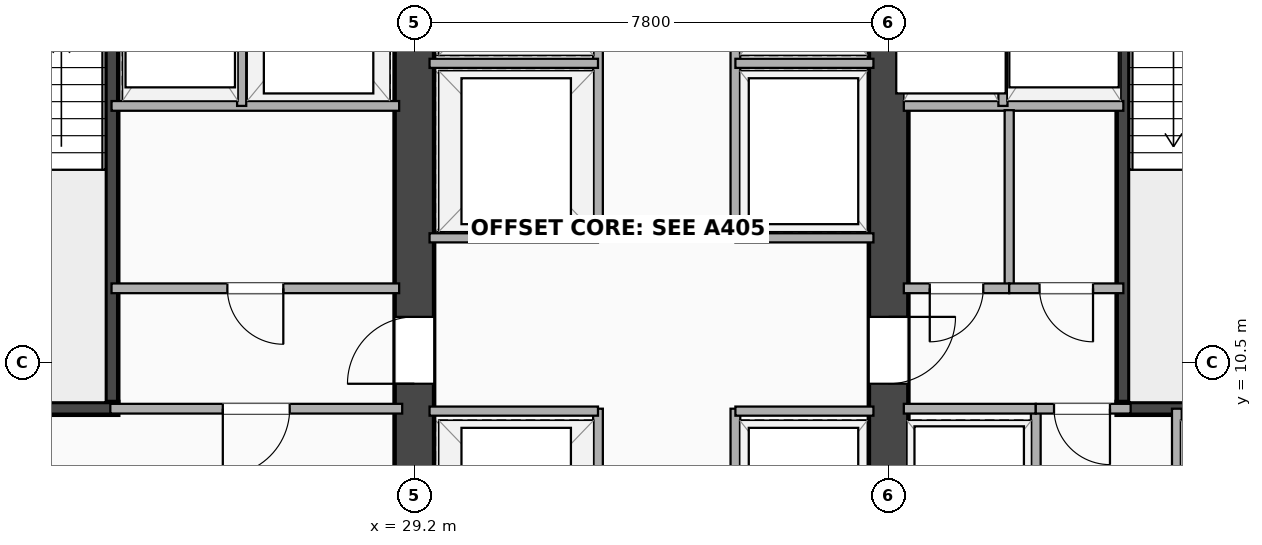
"""IFC4 building model, lengths in metres.
Left out: names, types, materials, properties, quantities, classifications, styles, units other than length and angle.
Written with IfcOpenShell. Run it as: python <this file> out.ifc"""

import sys

from ifc_helpers import new_model, si_unit, direction, frame, frame_2d, origin, place, context, subcontext, project, spatial, rectangle, extrude, element, fill, save


model = new_model("IFC4")
c1 = context("Model", 3, precision=1e-05, world=origin(), true_north=direction((0.0, 1.0)))
c2 = subcontext(c1, "Body", "Model", "MODEL_VIEW")
j1 = project(units=[si_unit("LENGTHUNIT", "METRE"), si_unit("PLANEANGLEUNIT", "RADIAN")], contexts=[c1])
p1 = place(None, origin())
s1 = spatial("IfcSite", under=j1, at=p1, CompositionType="ELEMENT")
p2 = place(p1, origin())
s2 = spatial("IfcBuilding", under=s1, at=p2, CompositionType="ELEMENT")
p3 = place(p2, frame((0.0, 0.0, 68.4)))
s3 = spatial("IfcBuildingStorey", under=s2, at=p3, CompositionType="ELEMENT", Elevation=68.4)
p4 = place(p3, frame((29.2, 3.5, 0.0), z_axis=(0.0, 0.0, 1.0), x_axis=(0.0, 1.0, 0.0)))
e1 = element("IfcWall", 1, at=p4, inside=s3, PredefinedType="SHEAR", context=c2, shape_type="SweptSolid", body=[
    extrude(rectangle(XDim=16.9, YDim=0.65, at=frame_2d((8.45, 0.0))), origin(), (0.0, 0.0, 1.0), 3.22),
])
p5 = place(p4, frame((7.75, 0.0, 0.0), z_axis=(0.0, 0.0, 1.0), x_axis=(-1.0, 0.0, 0.0)))
e2 = element("IfcOpeningElement", 2, at=p5, cuts=e1, PredefinedType="OPENING", context=c2, shape_type="SweptSolid", body=[
    extrude(rectangle(XDim=1.1, YDim=2.15, at=frame_2d((0.55, 1.075))), frame((0.0, 0.335, 0.0), z_axis=(0.0, -1.0, 0.0), x_axis=(1.0, 0.0, 0.0)), (0.0, 0.0, 1.0), 0.67),
])
p6 = place(p3, frame((37.0, 3.5, 0.0), z_axis=(0.0, 0.0, 1.0), x_axis=(0.0, 1.0, 0.0)))
e3 = element("IfcWall", 3, at=p6, inside=s3, PredefinedType="SHEAR", context=c2, shape_type="SweptSolid", body=[
    extrude(rectangle(XDim=16.9, YDim=0.65, at=frame_2d((8.45, 0.0))), origin(), (0.0, 0.0, 1.0), 3.22),
])
p7 = place(p6, frame((6.65, 0.0, 0.0)))
e4 = element("IfcOpeningElement", 4, at=p7, cuts=e3, PredefinedType="OPENING", context=c2, shape_type="SweptSolid", body=[
    extrude(rectangle(XDim=1.1, YDim=2.15, at=frame_2d((0.55, 1.075))), frame((0.0, 0.335, 0.0), z_axis=(0.0, -1.0, 0.0), x_axis=(1.0, 0.0, 0.0)), (0.0, 0.0, 1.0), 0.67),
])
p8 = place(p3, frame((24.225, 9.745, 0.0), z_axis=(0.0, 0.0, 1.0), x_axis=(0.0, 1.0, 0.0)))
e5 = element("IfcWall", 5, at=p8, inside=s3, PredefinedType="SHEAR", context=c2, shape_type="SweptSolid", body=[
    extrude(rectangle(XDim=8.01, YDim=0.21, at=frame_2d((4.005, 0.0))), origin(), (0.0, 0.0, 1.0), 3.22),
])
p9 = place(p3, frame((20.67, 9.745, 0.0), z_axis=(0.0, 0.0, 1.0), x_axis=(1.0, 0.0, 0.0)))
e6 = element("IfcWall", 6, at=p9, inside=s3, PredefinedType="SHEAR", context=c2, shape_type="SweptSolid", body=[
    extrude(rectangle(XDim=3.66, YDim=0.21, at=frame_2d((1.83, 0.0))), origin(), (0.0, 0.0, 1.0), 3.22),
])
p10 = place(p3, frame((40.855, 9.745, 0.0), z_axis=(0.0, 0.0, 1.0), x_axis=(0.0, 1.0, 0.0)))
e7 = element("IfcWall", 7, at=p10, inside=s3, PredefinedType="SHEAR", context=c2, shape_type="SweptSolid", body=[
    extrude(rectangle(XDim=8.01, YDim=0.21, at=frame_2d((4.005, 0.0))), origin(), (0.0, 0.0, 1.0), 3.22),
])
p11 = place(p3, frame((40.75, 9.745, 0.0), z_axis=(0.0, 0.0, 1.0), x_axis=(1.0, 0.0, 0.0)))
e8 = element("IfcWall", 8, at=p11, inside=s3, PredefinedType="SHEAR", context=c2, shape_type="SweptSolid", body=[
    extrude(rectangle(XDim=3.66, YDim=0.21, at=frame_2d((1.83, 0.0))), origin(), (0.0, 0.0, 1.0), 3.22),
])
p12 = place(p3, frame((24.22, 14.72, 0.0), z_axis=(0.0, 0.0, 1.0), x_axis=(1.0, 0.0, 0.0)))
e9 = element("IfcWall", 9, at=p12, inside=s3, PredefinedType="PARTITIONING", context=c2, shape_type="SweptSolid", body=[
    extrude(rectangle(XDim=4.73, YDim=0.16, at=frame_2d((2.365, 0.0))), origin(), (0.0, 0.0, 1.0), 3.22),
])
p13 = place(p3, frame((26.36, 14.72, 0.0), z_axis=(0.0, 0.0, 1.0), x_axis=(0.0, 1.0, 0.0)))
e10 = element("IfcWall", 10, at=p13, inside=s3, PredefinedType="PARTITIONING", context=c2, shape_type="SweptSolid", body=[
    extrude(rectangle(XDim=3.04, YDim=0.15, at=frame_2d((1.52, 0.0))), origin(), (0.0, 0.0, 1.0), 3.22),
])
p14 = place(p3, frame((37.25, 14.72, 0.0), z_axis=(0.0, 0.0, 1.0), x_axis=(1.0, 0.0, 0.0)))
e11 = element("IfcWall", 11, at=p14, inside=s3, PredefinedType="PARTITIONING", context=c2, shape_type="SweptSolid", body=[
    extrude(rectangle(XDim=3.61, YDim=0.16, at=frame_2d((1.805, 0.0))), origin(), (0.0, 0.0, 1.0), 3.22),
])
p15 = place(p3, frame((38.88, 14.72, 0.0), z_axis=(0.0, 0.0, 1.0), x_axis=(0.0, 1.0, 0.0)))
e12 = element("IfcWall", 12, at=p15, inside=s3, PredefinedType="PARTITIONING", context=c2, shape_type="SweptSolid", body=[
    extrude(rectangle(XDim=3.04, YDim=0.15, at=frame_2d((1.52, 0.0))), origin(), (0.0, 0.0, 1.0), 3.22),
])
p16 = place(p3, frame((24.22, 11.72, 0.0), z_axis=(0.0, 0.0, 1.0), x_axis=(1.0, 0.0, 0.0)))
e13 = element("IfcWall", 13, at=p16, inside=s3, PredefinedType="PARTITIONING", context=c2, shape_type="SweptSolid", body=[
    extrude(rectangle(XDim=4.73, YDim=0.16, at=frame_2d((2.365, 0.0))), origin(), (0.0, 0.0, 1.0), 3.22),
])
p17 = place(p16, frame((1.905, 0.0, 0.0)))
e14 = element("IfcOpeningElement", 14, at=p17, cuts=e13, PredefinedType="OPENING", context=c2, shape_type="SweptSolid", body=[
    extrude(rectangle(XDim=0.92, YDim=2.08, at=frame_2d((0.46, 1.04))), frame((0.0, 0.09, 0.0), z_axis=(0.0, -1.0, 0.0), x_axis=(1.0, 0.0, 0.0)), (0.0, 0.0, 1.0), 0.18),
])
p18 = place(p3, frame((38.983, 11.72, 0.0), z_axis=(0.0, 0.0, 1.0), x_axis=(0.0, 1.0, 0.0)))
e15 = element("IfcWall", 15, at=p18, inside=s3, PredefinedType="PARTITIONING", context=c2, shape_type="SweptSolid", body=[
    extrude(rectangle(XDim=2.93, YDim=0.15, at=frame_2d((1.465, 0.0))), origin(), (0.0, 0.0, 1.0), 3.22),
])
p19 = place(p3, frame((37.25, 11.72, 0.0), z_axis=(0.0, 0.0, 1.0), x_axis=(1.0, 0.0, 0.0)))
e16 = element("IfcWall", 16, at=p19, inside=s3, PredefinedType="PARTITIONING", context=c2, shape_type="SweptSolid", body=[
    extrude(rectangle(XDim=1.733, YDim=0.16, at=frame_2d((0.866, 0.0))), origin(), (0.0, 0.0, 1.0), 3.22),
])
p20 = place(p19, frame((0.427, 0.0, 0.0)))
e17 = element("IfcOpeningElement", 17, at=p20, cuts=e16, PredefinedType="OPENING", context=c2, shape_type="SweptSolid", body=[
    extrude(rectangle(XDim=0.88, YDim=2.08, at=frame_2d((0.44, 1.04))), frame((0.0, 0.09, 0.0), z_axis=(0.0, -1.0, 0.0), x_axis=(1.0, 0.0, 0.0)), (0.0, 0.0, 1.0), 0.18),
])
p21 = place(p3, frame((38.983, 11.72, 0.0), z_axis=(0.0, 0.0, 1.0), x_axis=(1.0, 0.0, 0.0)))
e18 = element("IfcWall", 18, at=p21, inside=s3, PredefinedType="PARTITIONING", context=c2, shape_type="SweptSolid", body=[
    extrude(rectangle(XDim=1.877, YDim=0.16, at=frame_2d((0.938, 0.0))), origin(), (0.0, 0.0, 1.0), 3.22),
])
p22 = place(p21, frame((0.499, 0.0, 0.0)))
e19 = element("IfcOpeningElement", 19, at=p22, cuts=e18, PredefinedType="OPENING", context=c2, shape_type="SweptSolid", body=[
    extrude(rectangle(XDim=0.88, YDim=2.08, at=frame_2d((0.44, 1.04))), frame((0.0, 0.09, 0.0), z_axis=(0.0, -1.0, 0.0), x_axis=(1.0, 0.0, 0.0)), (0.0, 0.0, 1.0), 0.18),
])
p23 = place(p3, frame((24.2, 9.74, 0.0), z_axis=(0.0, 0.0, 1.0), x_axis=(1.0, 0.0, 0.0)))
e20 = element("IfcWall", 20, at=p23, inside=s3, PredefinedType="PARTITIONING", context=c2, shape_type="SweptSolid", body=[
    extrude(rectangle(XDim=4.8, YDim=0.16, at=frame_2d((2.4, 0.0))), origin(), (0.0, 0.0, 1.0), 3.22),
])
p24 = place(p23, frame((1.85, 0.0, 0.0)))
e21 = element("IfcOpeningElement", 21, at=p24, cuts=e20, PredefinedType="OPENING", context=c2, shape_type="SweptSolid", body=[
    extrude(rectangle(XDim=1.1, YDim=2.15, at=frame_2d((0.55, 1.075))), frame((0.0, 0.09, 0.0), z_axis=(0.0, -1.0, 0.0), x_axis=(1.0, 0.0, 0.0)), (0.0, 0.0, 1.0), 0.18),
])
for number, where, z_axis, x_axis in (
    (22, (39.42, 3.9, 0.0), (0.0, 0.0, 1.0), (0.0, 1.0, 0.0)),
    (23, (41.74, 3.9, 0.0), (0.0, 0.0, 1.0), (0.0, 1.0, 0.0)),
):
    element("IfcWall", number, at=place(p3, frame(where, z_axis=z_axis, x_axis=x_axis)), inside=s3, PredefinedType="PARTITIONING", context=c2, shape_type="SweptSolid", body=[
        extrude(rectangle(XDim=5.84, YDim=0.16, at=frame_2d((2.92, 0.0))), origin(), (0.0, 0.0, 1.0), 3.22),
    ])
p25 = place(p3, frame((37.25, 9.74, 0.0), z_axis=(0.0, 0.0, 1.0), x_axis=(1.0, 0.0, 0.0)))
e24 = element("IfcWall", 24, at=p25, inside=s3, PredefinedType="PARTITIONING", context=c2, shape_type="SweptSolid", body=[
    extrude(rectangle(XDim=2.17, YDim=0.16, at=frame_2d((1.085, 0.0))), origin(), (0.0, 0.0, 1.0), 3.22),
])
p26 = place(p3, frame((39.42, 9.74, 0.0), z_axis=(0.0, 0.0, 1.0), x_axis=(1.0, 0.0, 0.0)))
e25 = element("IfcWall", 25, at=p26, inside=s3, PredefinedType="PARTITIONING", context=c2, shape_type="SweptSolid", body=[
    extrude(rectangle(XDim=1.56, YDim=0.16, at=frame_2d((0.78, 0.0))), origin(), (0.0, 0.0, 1.0), 3.22),
])
p27 = place(p26, frame((0.3, 0.0, 0.0)))
e26 = element("IfcOpeningElement", 26, at=p27, cuts=e25, PredefinedType="OPENING", context=c2, shape_type="SweptSolid", body=[
    extrude(rectangle(XDim=0.92, YDim=2.08, at=frame_2d((0.46, 1.04))), frame((0.0, 0.09, 0.0), z_axis=(0.0, -1.0, 0.0), x_axis=(1.0, 0.0, 0.0)), (0.0, 0.0, 1.0), 0.18),
])
p28 = place(p3, frame((32.22, 3.9, 0.0), z_axis=(0.0, 0.0, 1.0), x_axis=(0.0, 1.0, 0.0)))
e27 = element("IfcWall", 27, at=p28, inside=s3, PredefinedType="PARTITIONING", context=c2, shape_type="SweptSolid", body=[
    extrude(rectangle(XDim=5.84, YDim=0.16, at=frame_2d((2.92, 0.0))), origin(), (0.0, 0.0, 1.0), 3.22),
])
p29 = place(p28, frame((1.78, 0.0, 0.0), z_axis=(0.0, 0.0, 1.0), x_axis=(-1.0, 0.0, 0.0)))
e28 = element("IfcOpeningElement", 28, at=p29, cuts=e27, PredefinedType="OPENING", context=c2, shape_type="SweptSolid", body=[
    extrude(rectangle(XDim=1.08, YDim=2.16, at=frame_2d((0.54, 1.08))), frame((0.0, 0.09, 0.0), z_axis=(0.0, -1.0, 0.0), x_axis=(1.0, 0.0, 0.0)), (0.0, 0.0, 1.0), 0.18),
])
p30 = place(p28, frame((4.68, 0.0, 0.0), z_axis=(0.0, 0.0, 1.0), x_axis=(-1.0, 0.0, 0.0)))
e29 = element("IfcOpeningElement", 29, at=p30, cuts=e27, PredefinedType="OPENING", context=c2, shape_type="SweptSolid", body=[
    extrude(rectangle(XDim=1.08, YDim=2.16, at=frame_2d((0.54, 1.08))), frame((0.0, 0.09, 0.0), z_axis=(0.0, -1.0, 0.0), x_axis=(1.0, 0.0, 0.0)), (0.0, 0.0, 1.0), 0.18),
])
p31 = place(p3, frame((34.48, 3.9, 0.0), z_axis=(0.0, 0.0, 1.0), x_axis=(0.0, 1.0, 0.0)))
e30 = element("IfcWall", 30, at=p31, inside=s3, PredefinedType="PARTITIONING", context=c2, shape_type="SweptSolid", body=[
    extrude(rectangle(XDim=5.84, YDim=0.16, at=frame_2d((2.92, 0.0))), origin(), (0.0, 0.0, 1.0), 3.22),
])
p32 = place(p31, frame((0.7, 0.0, 0.0)))
e31 = element("IfcOpeningElement", 31, at=p32, cuts=e30, PredefinedType="OPENING", context=c2, shape_type="SweptSolid", body=[
    extrude(rectangle(XDim=1.08, YDim=2.16, at=frame_2d((0.54, 1.08))), frame((0.0, 0.09, 0.0), z_axis=(0.0, -1.0, 0.0), x_axis=(1.0, 0.0, 0.0)), (0.0, 0.0, 1.0), 0.18),
])
p33 = place(p31, frame((3.6, 0.0, 0.0)))
e32 = element("IfcOpeningElement", 32, at=p33, cuts=e30, PredefinedType="OPENING", context=c2, shape_type="SweptSolid", body=[
    extrude(rectangle(XDim=1.08, YDim=2.16, at=frame_2d((0.54, 1.08))), frame((0.0, 0.09, 0.0), z_axis=(0.0, -1.0, 0.0), x_axis=(1.0, 0.0, 0.0)), (0.0, 0.0, 1.0), 0.18),
])
p34 = place(p3, frame((29.45, 9.7, 0.0), z_axis=(0.0, 0.0, 1.0), x_axis=(1.0, 0.0, 0.0)))
e33 = element("IfcWall", 33, at=p34, inside=s3, PredefinedType="PARTITIONING", context=c2, shape_type="SweptSolid", body=[
    extrude(rectangle(XDim=2.77, YDim=0.15, at=frame_2d((1.385, 0.0))), origin(), (0.0, 0.0, 1.0), 3.22),
])
p35 = place(p3, frame((34.48, 9.7, 0.0), z_axis=(0.0, 0.0, 1.0), x_axis=(1.0, 0.0, 0.0)))
e34 = element("IfcWall", 34, at=p35, inside=s3, PredefinedType="PARTITIONING", context=c2, shape_type="SweptSolid", body=[
    extrude(rectangle(XDim=2.27, YDim=0.15, at=frame_2d((1.135, 0.0))), origin(), (0.0, 0.0, 1.0), 3.22),
])
p36 = place(p3, frame((32.22, 12.5, 0.0), z_axis=(0.0, 0.0, 1.0), x_axis=(0.0, 1.0, 0.0)))
e35 = element("IfcWall", 35, at=p36, inside=s3, PredefinedType="PARTITIONING", context=c2, shape_type="SweptSolid", body=[
    extrude(rectangle(XDim=7.92, YDim=0.16, at=frame_2d((3.96, 0.0))), origin(), (0.0, 0.0, 1.0), 2.51),
])
p37 = place(p36, frame((6.1, 0.0, 0.0)))
e36 = element("IfcOpeningElement", 36, at=p37, cuts=e35, PredefinedType="OPENING", context=c2, shape_type="SweptSolid", body=[
    extrude(rectangle(XDim=0.88, YDim=2.08, at=frame_2d((0.44, 1.04))), frame((0.0, 0.09, 0.0), z_axis=(0.0, -1.0, 0.0), x_axis=(1.0, 0.0, 0.0)), (0.0, 0.0, 1.0), 0.18),
])
p38 = place(p3, frame((34.48, 12.5, 0.0), z_axis=(0.0, 0.0, 1.0), x_axis=(0.0, 1.0, 0.0)))
e37 = element("IfcWall", 37, at=p38, inside=s3, PredefinedType="PARTITIONING", context=c2, shape_type="SweptSolid", body=[
    extrude(rectangle(XDim=7.92, YDim=0.16, at=frame_2d((3.96, 0.0))), origin(), (0.0, 0.0, 1.0), 2.51),
])
p39 = place(p38, frame((6.98, 0.0, 0.0), z_axis=(0.0, 0.0, 1.0), x_axis=(-1.0, 0.0, 0.0)))
e38 = element("IfcOpeningElement", 38, at=p39, cuts=e37, PredefinedType="OPENING", context=c2, shape_type="SweptSolid", body=[
    extrude(rectangle(XDim=0.88, YDim=2.08, at=frame_2d((0.44, 1.04))), frame((0.0, 0.09, 0.0), z_axis=(0.0, -1.0, 0.0), x_axis=(1.0, 0.0, 0.0)), (0.0, 0.0, 1.0), 0.18),
])
p40 = place(p3, frame((29.45, 12.55, 0.0), z_axis=(0.0, 0.0, 1.0), x_axis=(1.0, 0.0, 0.0)))
e39 = element("IfcWall", 39, at=p40, inside=s3, PredefinedType="PARTITIONING", context=c2, shape_type="SweptSolid", body=[
    extrude(rectangle(XDim=2.77, YDim=0.15, at=frame_2d((1.385, 0.0))), origin(), (0.0, 0.0, 1.0), 3.22),
])
p41 = place(p3, frame((34.48, 12.55, 0.0), z_axis=(0.0, 0.0, 1.0), x_axis=(1.0, 0.0, 0.0)))
e40 = element("IfcWall", 40, at=p41, inside=s3, PredefinedType="PARTITIONING", context=c2, shape_type="SweptSolid", body=[
    extrude(rectangle(XDim=2.27, YDim=0.15, at=frame_2d((1.135, 0.0))), origin(), (0.0, 0.0, 1.0), 3.22),
])
p42 = place(p3, frame((29.45, 15.42, 0.0), z_axis=(0.0, 0.0, 1.0), x_axis=(1.0, 0.0, 0.0)))
e41 = element("IfcWall", 41, at=p42, inside=s3, PredefinedType="PARTITIONING", context=c2, shape_type="SweptSolid", body=[
    extrude(rectangle(XDim=2.77, YDim=0.15, at=frame_2d((1.385, 0.0))), origin(), (0.0, 0.0, 1.0), 3.22),
])
p43 = place(p3, frame((34.48, 15.42, 0.0), z_axis=(0.0, 0.0, 1.0), x_axis=(1.0, 0.0, 0.0)))
e42 = element("IfcWall", 42, at=p43, inside=s3, PredefinedType="PARTITIONING", context=c2, shape_type="SweptSolid", body=[
    extrude(rectangle(XDim=2.27, YDim=0.15, at=frame_2d((1.135, 0.0))), origin(), (0.0, 0.0, 1.0), 3.22),
])
p44 = place(p5, origin())
e43 = element("IfcDoor", 43, at=p44, inside=s3, OperationType="SINGLE_SWING_LEFT", PredefinedType="DOOR", context=c2, shape_type="SweptSolid", body=[
    extrude(rectangle(XDim=1.1, YDim=2.15, at=frame_2d((0.55, 1.075))), frame((0.0, 0.025, 0.0), z_axis=(0.0, -1.0, 0.0), x_axis=(1.0, 0.0, 0.0)), (0.0, 0.0, 1.0), 0.05),
])
fill(e2, e43)
p45 = place(p7, origin())
e44 = element("IfcDoor", 44, at=p45, inside=s3, OperationType="SINGLE_SWING_RIGHT", PredefinedType="DOOR", context=c2, shape_type="SweptSolid", body=[
    extrude(rectangle(XDim=1.1, YDim=2.15, at=frame_2d((0.55, 1.075))), frame((0.0, 0.025, 0.0), z_axis=(0.0, -1.0, 0.0), x_axis=(1.0, 0.0, 0.0)), (0.0, 0.0, 1.0), 0.05),
])
fill(e4, e44)
p46 = place(p17, origin())
e45 = element("IfcDoor", 45, at=p46, inside=s3, OperationType="SINGLE_SWING_RIGHT", PredefinedType="DOOR", context=c2, shape_type="SweptSolid", body=[
    extrude(rectangle(XDim=0.92, YDim=2.08, at=frame_2d((0.46, 1.04))), frame((0.0, 0.025, 0.0), z_axis=(0.0, -1.0, 0.0), x_axis=(1.0, 0.0, 0.0)), (0.0, 0.0, 1.0), 0.05),
])
fill(e14, e45)
p47 = place(p20, origin())
e46 = element("IfcDoor", 46, at=p47, inside=s3, OperationType="SINGLE_SWING_LEFT", PredefinedType="DOOR", context=c2, shape_type="SweptSolid", body=[
    extrude(rectangle(XDim=0.88, YDim=2.08, at=frame_2d((0.44, 1.04))), frame((0.0, 0.025, 0.0), z_axis=(0.0, -1.0, 0.0), x_axis=(1.0, 0.0, 0.0)), (0.0, 0.0, 1.0), 0.05),
])
fill(e17, e46)
p48 = place(p22, origin())
e47 = element("IfcDoor", 47, at=p48, inside=s3, OperationType="SINGLE_SWING_RIGHT", PredefinedType="DOOR", context=c2, shape_type="SweptSolid", body=[
    extrude(rectangle(XDim=0.88, YDim=2.08, at=frame_2d((0.44, 1.04))), frame((0.0, 0.025, 0.0), z_axis=(0.0, -1.0, 0.0), x_axis=(1.0, 0.0, 0.0)), (0.0, 0.0, 1.0), 0.05),
])
fill(e19, e47)
p49 = place(p24, origin())
e48 = element("IfcDoor", 48, at=p49, inside=s3, OperationType="SINGLE_SWING_LEFT", PredefinedType="DOOR", context=c2, shape_type="SweptSolid", body=[
    extrude(rectangle(XDim=1.1, YDim=2.15, at=frame_2d((0.55, 1.075))), frame((0.0, 0.025, 0.0), z_axis=(0.0, -1.0, 0.0), x_axis=(1.0, 0.0, 0.0)), (0.0, 0.0, 1.0), 0.05),
])
fill(e21, e48)
p50 = place(p27, origin())
e49 = element("IfcDoor", 49, at=p50, inside=s3, OperationType="SINGLE_SWING_RIGHT", PredefinedType="DOOR", context=c2, shape_type="SweptSolid", body=[
    extrude(rectangle(XDim=0.92, YDim=2.08, at=frame_2d((0.46, 1.04))), frame((0.0, 0.025, 0.0), z_axis=(0.0, -1.0, 0.0), x_axis=(1.0, 0.0, 0.0)), (0.0, 0.0, 1.0), 0.05),
])
fill(e26, e49)
save(model, sys.argv[1])
